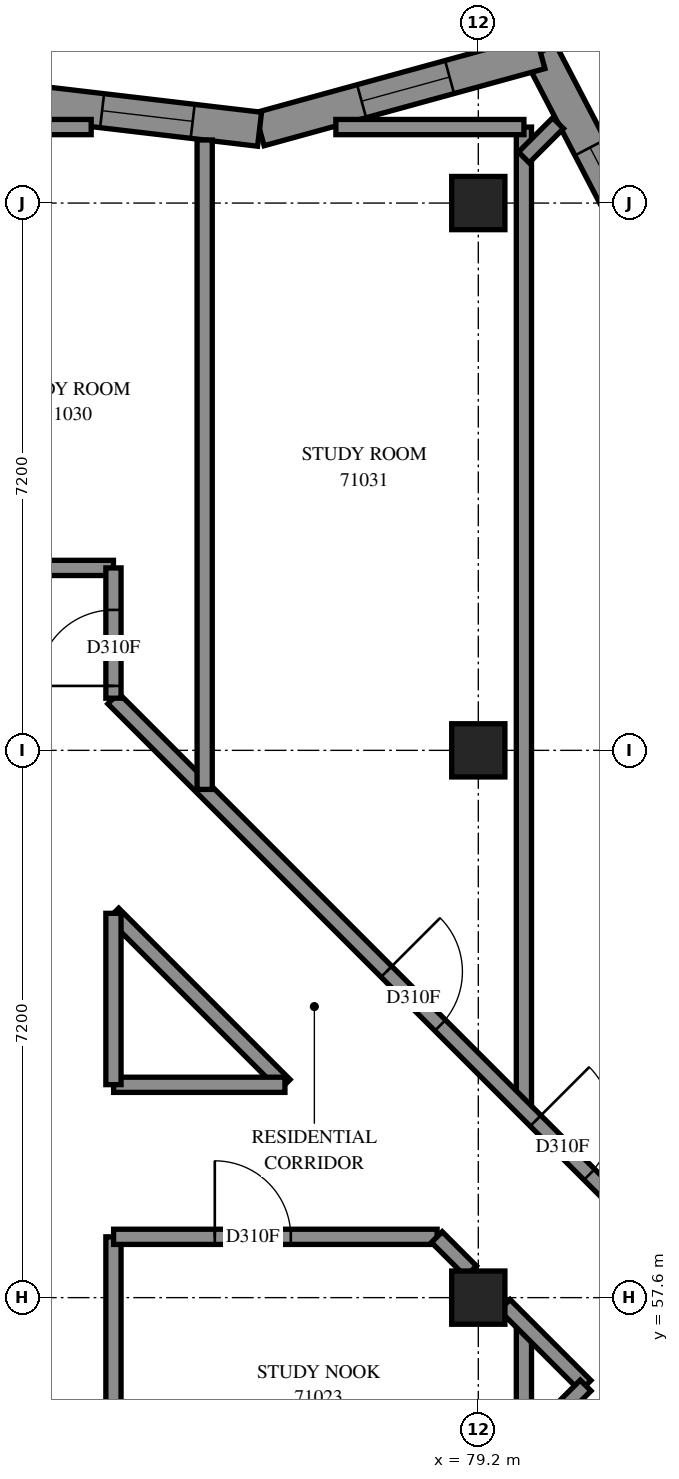
"""IFC4 building model, lengths in metres.
Left out: names, types, materials, properties, quantities, classifications, styles, units other than length and angle.
Written with IfcOpenShell. Run it as: python <this file> out.ifc"""

import sys

from ifc_helpers import new_model, si_unit, direction, frame, frame_2d, origin, origin_2d, place, context, subcontext, project, spatial, polyline, rectangle, outline, extrude, element, fill, save


model = new_model("IFC4")
c1 = context("Model", 3, precision=1e-05, world=origin(), true_north=direction((0.0, 1.0)))
c2 = subcontext(c1, "Body", "Model", "MODEL_VIEW")
j1 = project(units=[si_unit("LENGTHUNIT", "METRE"), si_unit("PLANEANGLEUNIT", "RADIAN")], contexts=[c1])
p1 = place(None, origin())
s1 = spatial("IfcSite", under=j1, at=p1, CompositionType="ELEMENT")
p2 = place(p1, origin())
s2 = spatial("IfcBuilding", under=s1, at=p2, CompositionType="ELEMENT")
p3 = place(p2, frame((0.0, 0.0, 260.8)))
s3 = spatial("IfcBuildingStorey", under=s2, at=p3, CompositionType="ELEMENT", Elevation=260.8)
for number, where, z_axis, x_axis in (
    (1, (79.2, 57.6, 0.0), (0.0, 0.0, 1.0), (1.0, 0.0, 0.0)),
    (2, (79.2, 64.8, 0.0), (0.0, 0.0, 1.0), (1.0, 0.0, 0.0)),
    (3, (79.2, 72.0, 0.0), (0.0, 0.0, 1.0), (1.0, 0.0, 0.0)),
):
    element("IfcColumn", number, at=place(p3, frame(where, z_axis=z_axis, x_axis=x_axis)), inside=s3, PredefinedType="COLUMN", context=c2, shape_type="SweptSolid", body=[
        extrude(rectangle(XDim=0.7, YDim=0.7, at=origin_2d()), origin(), (0.0, 0.0, 1.0), 3.1),
    ])
p4 = place(p3, frame((76.513, 49.231, -0.3), z_axis=(0.0, 0.0, 1.0), x_axis=(0.7071067812, 0.7071067812, 0.0)))
e4 = element("IfcWall", 4, at=p4, inside=s3, PredefinedType="SHEAR", context=c2, shape_type="SweptSolid", body=[
    extrude(rectangle(XDim=14.4, YDim=0.4, at=frame_2d((7.2, 0.0))), origin(), (0.0, 0.0, 1.0), 2.7),
])
p5 = place(p4, frame((4.55, 0.0, 0.3)))
e5 = element("IfcOpeningElement", 5, at=p5, cuts=e4, PredefinedType="OPENING", context=c2, shape_type="SweptSolid", body=[
    extrude(rectangle(XDim=1.1, YDim=2.1, at=frame_2d((0.55, 1.05))), frame((0.0, 0.21, 0.0), z_axis=(0.0, -1.0, 0.0), x_axis=(1.0, 0.0, 0.0)), (0.0, 0.0, 1.0), 0.42),
])
p6 = place(p4, frame((11.35, 0.0, 0.3)))
e6 = element("IfcOpeningElement", 6, at=p6, cuts=e4, PredefinedType="OPENING", context=c2, shape_type="SweptSolid", body=[
    extrude(rectangle(XDim=1.1, YDim=2.1, at=frame_2d((0.55, 1.05))), frame((0.0, 0.21, 0.0), z_axis=(0.0, -1.0, 0.0), x_axis=(1.0, 0.0, 0.0)), (0.0, 0.0, 1.0), 0.42),
])
p7 = place(p3, frame((81.57, 71.002, 0.0), z_axis=(0.0, 0.0, 1.0), x_axis=(-0.4617458541, 0.8870122695, 0.0)))
e7 = element("IfcWall", 7, at=p7, inside=s3, PredefinedType="SOLIDWALL", context=c2, shape_type="SweptSolid", body=[
    extrude(outline(polyline([(0.05, -0.225), (3.545, -0.225), (3.182, 0.225), (-0.05, 0.225), (0.05, -0.225)])), origin(), (0.0, 0.0, 1.0), 3.1),
])
p8 = place(p7, frame((0.748, 0.0, 0.45)))
e8 = element("IfcOpeningElement", 8, at=p8, cuts=e7, PredefinedType="OPENING", context=c2, shape_type="SweptSolid", body=[
    extrude(rectangle(XDim=1.2, YDim=2.55, at=frame_2d((0.6, 1.275))), frame((0.0, 0.235, 0.0), z_axis=(0.0, -1.0, 0.0), x_axis=(1.0, 0.0, 0.0)), (0.0, 0.0, 1.0), 0.47),
])
p9 = place(p3, frame((80.017, 73.986, 0.0), z_axis=(0.0, 0.0, 1.0), x_axis=(-0.9643045882, -0.2647955081, 0.0)))
e9 = element("IfcWall", 9, at=p9, inside=s3, PredefinedType="SOLIDWALL", context=c2, shape_type="SweptSolid", body=[
    extrude(outline(polyline([(-0.182, -0.225), (3.787, -0.225), (3.875, 0.225), (0.182, 0.225), (-0.182, -0.225)])), origin(), (0.0, 0.0, 1.0), 3.1),
])
p10 = place(p9, frame((1.239, 0.0, 0.45)))
e10 = element("IfcOpeningElement", 10, at=p10, cuts=e9, PredefinedType="OPENING", context=c2, shape_type="SweptSolid", body=[
    extrude(rectangle(XDim=1.2, YDim=2.55, at=frame_2d((0.6, 1.275))), frame((0.0, 0.235, 0.0), z_axis=(0.0, -1.0, 0.0), x_axis=(1.0, 0.0, 0.0)), (0.0, 0.0, 1.0), 0.47),
])
p11 = place(p3, frame((76.322, 72.971, 0.0), z_axis=(0.0, 0.0, 1.0), x_axis=(-0.9931297821, 0.117018101, 0.0)))
e11 = element("IfcWall", 11, at=p11, inside=s3, PredefinedType="SOLIDWALL", context=c2, shape_type="SweptSolid", body=[
    extrude(outline(polyline([(0.044, -0.225), (3.898, -0.225), (3.845, 0.225), (-0.044, 0.225), (0.044, -0.225)])), origin(), (0.0, 0.0, 1.0), 3.1),
])
p12 = place(p11, frame((0.886, 0.0, 0.45)))
e12 = element("IfcOpeningElement", 12, at=p12, cuts=e11, PredefinedType="OPENING", context=c2, shape_type="SweptSolid", body=[
    extrude(rectangle(XDim=1.2, YDim=2.55, at=frame_2d((0.6, 1.275))), frame((0.0, 0.235, 0.0), z_axis=(0.0, -1.0, 0.0), x_axis=(1.0, 0.0, 0.0)), (0.0, 0.0, 1.0), 0.47),
])
p13 = place(p3, frame((55.2, 67.2, 0.0), z_axis=(0.0, 0.0, 1.0), x_axis=(1.0, 0.0, 0.0)))
e13 = element("IfcWall", 13, at=p13, inside=s3, PredefinedType="PARTITIONING", context=c2, shape_type="SweptSolid", body=[
    extrude(rectangle(XDim=19.2, YDim=0.2, at=frame_2d((9.6, 0.0))), origin(), (0.0, 0.0, 1.0), 3.1),
])
p14 = place(p13, frame((4.475, 0.0, 0.0)))
e14 = element("IfcOpeningElement", 14, at=p14, cuts=e13, PredefinedType="OPENING", context=c2, shape_type="SweptSolid", body=[
    extrude(rectangle(XDim=1.0, YDim=2.1, at=frame_2d((0.5, 1.05))), frame((0.0, 0.11, 0.0), z_axis=(0.0, -1.0, 0.0), x_axis=(1.0, 0.0, 0.0)), (0.0, 0.0, 1.0), 0.22),
])
p15 = place(p13, frame((8.301, 0.0, 0.0)))
e15 = element("IfcOpeningElement", 15, at=p15, cuts=e13, PredefinedType="OPENING", context=c2, shape_type="SweptSolid", body=[
    extrude(rectangle(XDim=0.9, YDim=2.1, at=frame_2d((0.45, 1.05))), frame((0.0, 0.11, 0.0), z_axis=(0.0, -1.0, 0.0), x_axis=(1.0, 0.0, 0.0)), (0.0, 0.0, 1.0), 0.22),
])
p16 = place(p13, frame((13.88, 0.0, 0.0)))
e16 = element("IfcOpeningElement", 16, at=p16, cuts=e13, PredefinedType="OPENING", context=c2, shape_type="SweptSolid", body=[
    extrude(rectangle(XDim=1.0, YDim=2.1, at=frame_2d((0.5, 1.05))), frame((0.0, 0.11, 0.0), z_axis=(0.0, -1.0, 0.0), x_axis=(1.0, 0.0, 0.0)), (0.0, 0.0, 1.0), 0.22),
])
p17 = place(p3, frame((79.8, 60.086, 0.0), z_axis=(0.0, 0.0, 1.0), x_axis=(0.0, 1.0, 0.0)))
e17 = element("IfcWall", 17, at=p17, inside=s3, PredefinedType="PARTITIONING", context=c2, shape_type="SweptSolid", body=[
    extrude(rectangle(XDim=12.914, YDim=0.2, at=frame_2d((6.457, 0.0))), origin(), (0.0, 0.0, 1.0), 3.1),
])
p18 = place(p3, frame((74.397, 65.483, 0.0), z_axis=(0.0, 0.0, 1.0), x_axis=(0.7071067812, -0.7071067812, 0.0)))
e18 = element("IfcWall", 18, at=p18, inside=s3, PredefinedType="PARTITIONING", context=c2, shape_type="SweptSolid", body=[
    extrude(rectangle(XDim=10.788, YDim=0.2, at=frame_2d((5.394, 0.0))), origin(), (0.0, 0.0, 1.0), 3.1),
])
p19 = place(p18, frame((5.083, 0.0, 0.0)))
e19 = element("IfcOpeningElement", 19, at=p19, cuts=e18, PredefinedType="OPENING", context=c2, shape_type="SweptSolid", body=[
    extrude(rectangle(XDim=1.0, YDim=2.1, at=frame_2d((0.5, 1.05))), frame((0.0, 0.11, 0.0), z_axis=(0.0, -1.0, 0.0), x_axis=(1.0, 0.0, 0.0)), (0.0, 0.0, 1.0), 0.22),
])
p20 = place(p18, frame((7.858, 0.0, 0.0)))
e20 = element("IfcOpeningElement", 20, at=p20, cuts=e18, PredefinedType="OPENING", context=c2, shape_type="SweptSolid", body=[
    extrude(rectangle(XDim=1.0, YDim=2.1, at=frame_2d((0.5, 1.05))), frame((0.0, 0.11, 0.0), z_axis=(0.0, -1.0, 0.0), x_axis=(1.0, 0.0, 0.0)), (0.0, 0.0, 1.0), 0.22),
])
p21 = place(p3, frame((75.6, 64.286, 0.0), z_axis=(0.0, 0.0, 1.0), x_axis=(0.0, 1.0, 0.0)))
e21 = element("IfcWall", 21, at=p21, inside=s3, PredefinedType="PARTITIONING", context=c2, shape_type="SweptSolid", body=[
    extrude(rectangle(XDim=8.544, YDim=0.2, at=frame_2d((4.272, 0.0))), origin(), (0.0, 0.0, 1.0), 3.1),
])
p22 = place(p3, frame((74.4, 53.202, 0.0), z_axis=(0.0, 0.0, 1.0), x_axis=(0.0, 1.0, 0.0)))
e22 = element("IfcWall", 22, at=p22, inside=s3, PredefinedType="PARTITIONING", context=c2, shape_type="SweptSolid", body=[
    extrude(rectangle(XDim=5.198, YDim=0.2, at=frame_2d((2.599, 0.0))), origin(), (0.0, 0.0, 1.0), 3.1),
])
p23 = place(p3, frame((74.402, 58.4, 0.0), z_axis=(0.0, 0.0, 1.0), x_axis=(1.0, 0.0, 0.0)))
e23 = element("IfcWall", 23, at=p23, inside=s3, PredefinedType="PARTITIONING", context=c2, shape_type="SweptSolid", body=[
    extrude(rectangle(XDim=4.256, YDim=0.2, at=frame_2d((2.128, 0.0))), origin(), (0.0, 0.0, 1.0), 3.1),
])
p24 = place(p23, frame((1.331, 0.0, 0.0)))
e24 = element("IfcOpeningElement", 24, at=p24, cuts=e23, PredefinedType="OPENING", context=c2, shape_type="SweptSolid", body=[
    extrude(rectangle(XDim=1.0, YDim=2.1, at=frame_2d((0.5, 1.05))), frame((0.0, 0.11, 0.0), z_axis=(0.0, -1.0, 0.0), x_axis=(1.0, 0.0, 0.0)), (0.0, 0.0, 1.0), 0.22),
])
p25 = place(p3, frame((70.848, 73.0, 0.0), z_axis=(0.0, 0.0, 1.0), x_axis=(1.0, 0.0, 0.0)))
e25 = element("IfcWall", 25, at=p25, inside=s3, PredefinedType="PARTITIONING", context=c2, shape_type="SweptSolid", body=[
    extrude(rectangle(XDim=3.259, YDim=0.2, at=frame_2d((1.629, 0.0))), origin(), (0.0, 0.0, 1.0), 3.1),
])
p26 = place(p3, frame((74.399, 62.653, 0.0), z_axis=(0.0, 0.0, 1.0), x_axis=(0.7071067812, -0.7071067812, 0.0)))
e26 = element("IfcWall", 26, at=p26, inside=s3, PredefinedType="PARTITIONING", context=c2, shape_type="SweptSolid", body=[
    extrude(rectangle(XDim=3.188, YDim=0.2, at=frame_2d((1.594, 0.0))), origin(), (0.0, 0.0, 1.0), 3.1),
])
p27 = place(p3, frame((77.326, 73.0, 0.0), z_axis=(0.0, 0.0, 1.0), x_axis=(1.0, 0.0, 0.0)))
e27 = element("IfcWall", 27, at=p27, inside=s3, PredefinedType="PARTITIONING", context=c2, shape_type="SweptSolid", body=[
    extrude(rectangle(XDim=2.474, YDim=0.2, at=frame_2d((1.237, 0.0))), origin(), (0.0, 0.0, 1.0), 3.1),
])
for number, where, z_axis, x_axis in (
    (28, (74.402, 60.4, 0.0), (0.0, 0.0, 1.0), (1.0, 0.0, 0.0)),
    (29, (74.4, 60.402, 0.0), (0.0, 0.0, 1.0), (0.0, 1.0, 0.0)),
):
    element("IfcWall", number, at=place(p3, frame(where, z_axis=z_axis, x_axis=x_axis)), inside=s3, PredefinedType="PARTITIONING", context=c2, shape_type="SweptSolid", body=[
        extrude(rectangle(XDim=2.254, YDim=0.2, at=frame_2d((1.127, 0.0))), origin(), (0.0, 0.0, 1.0), 3.1),
    ])
p28 = place(p3, frame((74.4, 65.486, 0.0), z_axis=(0.0, 0.0, 1.0), x_axis=(0.0, 1.0, 0.0)))
e30 = element("IfcWall", 30, at=p28, inside=s3, PredefinedType="PARTITIONING", context=c2, shape_type="SweptSolid", body=[
    extrude(rectangle(XDim=1.714, YDim=0.2, at=frame_2d((0.857, 0.0))), origin(), (0.0, 0.0, 1.0), 3.1),
])
p29 = place(p28, frame((0.162, 0.0, 0.0)))
e31 = element("IfcOpeningElement", 31, at=p29, cuts=e30, PredefinedType="OPENING", context=c2, shape_type="SweptSolid", body=[
    extrude(rectangle(XDim=1.0, YDim=2.1, at=frame_2d((0.5, 1.05))), frame((0.0, 0.11, 0.0), z_axis=(0.0, -1.0, 0.0), x_axis=(1.0, 0.0, 0.0)), (0.0, 0.0, 1.0), 0.22),
])
p30 = place(p3, frame((79.8, 55.63, 0.0), z_axis=(0.0, 0.0, 1.0), x_axis=(0.0, 1.0, 0.0)))
e32 = element("IfcWall", 32, at=p30, inside=s3, PredefinedType="PARTITIONING", context=c2, shape_type="SweptSolid", body=[
    extrude(rectangle(XDim=1.628, YDim=0.2, at=frame_2d((0.814, 0.0))), origin(), (0.0, 0.0, 1.0), 3.1),
])
p31 = place(p3, frame((79.547, 57.505, 0.0), z_axis=(0.0, 0.0, 1.0), x_axis=(0.7071067812, -0.7071067812, 0.0)))
e33 = element("IfcWall", 33, at=p31, inside=s3, PredefinedType="PARTITIONING", context=c2, shape_type="SweptSolid", body=[
    extrude(rectangle(XDim=1.505, YDim=0.2, at=frame_2d((0.752, 0.0))), origin(), (0.0, 0.0, 1.0), 3.1),
])
p32 = place(p3, frame((79.798, 55.632, 0.0), z_axis=(0.0, 0.0, 1.0), x_axis=(0.7079759957, 0.7062364969, 0.0)))
e34 = element("IfcWall", 34, at=p32, inside=s3, PredefinedType="PARTITIONING", context=c2, shape_type="SweptSolid", body=[
    extrude(rectangle(XDim=1.15, YDim=0.2, at=frame_2d((0.575, 0.0))), origin(), (0.0, 0.0, 1.0), 3.1),
])
p33 = place(p3, frame((78.655, 58.397, 0.0), z_axis=(0.0, 0.0, 1.0), x_axis=(0.7071067812, -0.7071067812, 0.0)))
e35 = element("IfcWall", 35, at=p33, inside=s3, PredefinedType="PARTITIONING", context=c2, shape_type="SweptSolid", body=[
    extrude(rectangle(XDim=0.636, YDim=0.2, at=frame_2d((0.318, 0.0))), origin(), (0.0, 0.0, 1.0), 3.1),
])
p34 = place(p3, frame((79.799, 72.601, 0.0), z_axis=(0.0, 0.0, 1.0), x_axis=(0.7070282879, 0.7071852658, 0.0)))
e36 = element("IfcWall", 36, at=p34, inside=s3, PredefinedType="PARTITIONING", context=c2, shape_type="SweptSolid", body=[
    extrude(rectangle(XDim=0.637, YDim=0.2, at=frame_2d((0.319, 0.0))), origin(), (0.0, 0.0, 1.0), 3.1),
])
p35 = place(p8, origin())
e37 = element("IfcWindow", 37, at=p35, inside=s3, PartitioningType="SINGLE_PANEL", PredefinedType="WINDOW", context=c2, shape_type="SweptSolid", body=[
    extrude(rectangle(XDim=1.2, YDim=2.55, at=frame_2d((0.6, 1.275))), frame((0.0, 0.205, 0.0), z_axis=(0.0, -1.0, 0.0), x_axis=(1.0, 0.0, 0.0)), (0.0, 0.0, 1.0), 0.06),
])
fill(e8, e37)
p36 = place(p10, origin())
e38 = element("IfcWindow", 38, at=p36, inside=s3, PartitioningType="SINGLE_PANEL", PredefinedType="WINDOW", context=c2, shape_type="SweptSolid", body=[
    extrude(rectangle(XDim=1.2, YDim=2.55, at=frame_2d((0.6, 1.275))), frame((0.0, 0.205, 0.0), z_axis=(0.0, -1.0, 0.0), x_axis=(1.0, 0.0, 0.0)), (0.0, 0.0, 1.0), 0.06),
])
fill(e10, e38)
p37 = place(p12, origin())
e39 = element("IfcWindow", 39, at=p37, inside=s3, PartitioningType="SINGLE_PANEL", PredefinedType="WINDOW", context=c2, shape_type="SweptSolid", body=[
    extrude(rectangle(XDim=1.2, YDim=2.55, at=frame_2d((0.6, 1.275))), frame((0.0, 0.205, 0.0), z_axis=(0.0, -1.0, 0.0), x_axis=(1.0, 0.0, 0.0)), (0.0, 0.0, 1.0), 0.06),
])
fill(e12, e39)
p38 = place(p24, origin())
e40 = element("IfcDoor", 40, at=p38, inside=s3, OperationType="SINGLE_SWING_RIGHT", PredefinedType="DOOR", context=c2, shape_type="SweptSolid", body=[
    extrude(rectangle(XDim=1.0, YDim=2.1, at=frame_2d((0.5, 1.05))), frame((0.0, 0.025, 0.0), z_axis=(0.0, -1.0, 0.0), x_axis=(1.0, 0.0, 0.0)), (0.0, 0.0, 1.0), 0.05),
])
fill(e24, e40)
p39 = place(p29, origin())
e41 = element("IfcDoor", 41, at=p39, inside=s3, OperationType="SINGLE_SWING_RIGHT", PredefinedType="DOOR", context=c2, shape_type="SweptSolid", body=[
    extrude(rectangle(XDim=1.0, YDim=2.1, at=frame_2d((0.5, 1.05))), frame((0.0, 0.025, 0.0), z_axis=(0.0, -1.0, 0.0), x_axis=(1.0, 0.0, 0.0)), (0.0, 0.0, 1.0), 0.05),
])
fill(e31, e41)
p40 = place(p19, origin())
e42 = element("IfcDoor", 42, at=p40, inside=s3, OperationType="SINGLE_SWING_LEFT", PredefinedType="DOOR", context=c2, shape_type="SweptSolid", body=[
    extrude(rectangle(XDim=1.0, YDim=2.1, at=frame_2d((0.5, 1.05))), frame((0.0, 0.025, 0.0), z_axis=(0.0, -1.0, 0.0), x_axis=(1.0, 0.0, 0.0)), (0.0, 0.0, 1.0), 0.05),
])
fill(e19, e42)
p41 = place(p20, origin())
e43 = element("IfcDoor", 43, at=p41, inside=s3, OperationType="SINGLE_SWING_LEFT", PredefinedType="DOOR", context=c2, shape_type="SweptSolid", body=[
    extrude(rectangle(XDim=1.0, YDim=2.1, at=frame_2d((0.5, 1.05))), frame((0.0, 0.025, 0.0), z_axis=(0.0, -1.0, 0.0), x_axis=(1.0, 0.0, 0.0)), (0.0, 0.0, 1.0), 0.05),
])
fill(e20, e43)
save(model, sys.argv[1])
